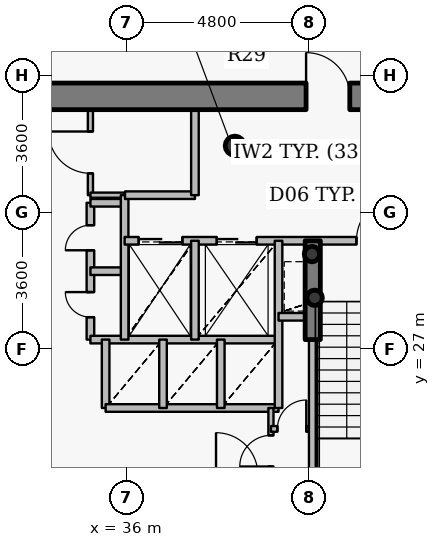
"""IFC4 building model, lengths in metres.
Left out: names, types, materials, properties, quantities, classifications, styles, units other than length and angle.
Written with IfcOpenShell. Run it as: python <this file> out.ifc"""

import sys

from ifc_helpers import new_model, si_unit, direction, frame, frame_2d, origin, origin_2d, place, context, subcontext, project, spatial, rectangle, hollow_circle, extrude, source, transform, mapped, element, fill, save


model = new_model("IFC4")
c1 = context("Model", 3, precision=1e-05, world=origin(), true_north=direction((0.0, 1.0)))
c2 = subcontext(c1, "Body", "Model", "MODEL_VIEW")
j1 = project(units=[si_unit("LENGTHUNIT", "METRE"), si_unit("PLANEANGLEUNIT", "RADIAN")], contexts=[c1])
p1 = place(None, origin())
s1 = spatial("IfcSite", under=j1, at=p1, CompositionType="ELEMENT")
p2 = place(p1, origin())
s2 = spatial("IfcBuilding", under=s1, at=p2, CompositionType="ELEMENT")
p3 = place(p2, frame((0.0, 0.0, 221.55)))
s3 = spatial("IfcBuildingStorey", under=s2, at=p3, CompositionType="ELEMENT", Elevation=221.55)
p4 = place(p3, frame((38.85, 32.35, 0.0), z_axis=(0.0, 0.0, 1.0), x_axis=(1.0, 0.0, 0.0)))
e1 = element("IfcColumn", 1, at=p4, inside=s3, PredefinedType="COLUMN", context=c2, shape_type="SweptSolid", body=[
    extrude(hollow_circle(Radius=0.254, WallThickness=0.02, at=origin_2d()), origin(), (0.0, 0.0, 1.0), 3.75),
])
for number, where, z_axis, x_axis in (
    (2, (40.95, 28.35, 0.0), (0.0, 0.0, 1.0), (1.0, 0.0, 0.0)),
    (3, (40.88, 29.5, 0.0), (0.0, 0.0, 1.0), (1.0, 0.0, 0.0)),
):
    element("IfcColumn", number, at=place(p3, frame(where, z_axis=z_axis, x_axis=x_axis)), inside=s3, PredefinedType="COLUMN", context=c2, shape_type="SweptSolid", body=[
        extrude(hollow_circle(Radius=0.203, WallThickness=0.016, at=origin_2d()), origin(), (0.0, 0.0, 1.0), 3.75),
    ])
p5 = place(p3, frame((27.05, 33.65, 0.0), z_axis=(0.0, 0.0, 1.0), x_axis=(1.0, 0.0, 0.0)))
e4 = element("IfcWall", 4, at=p5, inside=s3, PredefinedType="SHEAR", context=c2, shape_type="SweptSolid", body=[
    extrude(rectangle(XDim=17.9, YDim=0.7, at=frame_2d((8.95, 0.0))), origin(), (0.0, 0.0, 1.0), 3.05),
])
p6 = place(p5, frame((13.675, 0.0, 0.0)))
e5 = element("IfcOpeningElement", 5, at=p6, cuts=e4, PredefinedType="OPENING", context=c2, shape_type="SweptSolid", body=[
    extrude(rectangle(XDim=1.15, YDim=2.15, at=origin_2d()), frame((0.575, 0.36, 1.075), z_axis=(0.0, -1.0, 0.0), x_axis=(1.0, 0.0, 0.0)), (0.0, 0.0, 1.0), 0.72),
])
p7 = place(p3, frame((40.9, 27.25, 0.0), z_axis=(0.0, 0.0, 1.0), x_axis=(0.0, 1.0, 0.0)))
e6 = element("IfcWall", 6, at=p7, inside=s3, PredefinedType="SHEAR", context=c2, shape_type="SweptSolid", body=[
    extrude(rectangle(XDim=2.6, YDim=0.4, at=frame_2d((1.3, 0.0))), origin(), (0.0, 0.0, 1.0), 3.1),
])
p8 = place(p3, frame((35.05, 27.25, 0.0), z_axis=(0.0, 0.0, 1.0), x_axis=(0.0, 1.0, 0.0)))
e7 = element("IfcWall", 7, at=p8, inside=s3, PredefinedType="PARTITIONING", context=c2, shape_type="SweptSolid", body=[
    extrude(rectangle(XDim=3.6, YDim=0.2, at=frame_2d((1.8, 0.0))), origin(), (0.0, 0.0, 1.0), 3.5),
])
p9 = place(p8, frame((0.59, 0.0, 0.0)))
e8 = element("IfcOpeningElement", 8, at=p9, cuts=e7, PredefinedType="OPENING", context=c2, shape_type="SweptSolid", body=[
    extrude(rectangle(XDim=0.66, YDim=2.05, at=origin_2d()), frame((0.33, 0.11, 1.025), z_axis=(0.0, -1.0, 0.0), x_axis=(1.0, 0.0, 0.0)), (0.0, 0.0, 1.0), 0.22),
])
p10 = place(p8, frame((2.35, 0.0, 0.0)))
e9 = element("IfcOpeningElement", 9, at=p10, cuts=e7, PredefinedType="OPENING", context=c2, shape_type="SweptSolid", body=[
    extrude(rectangle(XDim=0.66, YDim=2.05, at=origin_2d()), frame((0.33, 0.11, 1.025), z_axis=(0.0, -1.0, 0.0), x_axis=(1.0, 0.0, 0.0)), (0.0, 0.0, 1.0), 0.22),
])
p11 = place(p3, frame((35.05, 27.25, 0.0), z_axis=(0.0, 0.0, 1.0), x_axis=(1.0, 0.0, 0.0)))
e10 = element("IfcWall", 10, at=p11, inside=s3, PredefinedType="PARTITIONING", context=c2, shape_type="SweptSolid", body=[
    extrude(rectangle(XDim=4.95, YDim=0.2, at=frame_2d((2.475, 0.0))), origin(), (0.0, 0.0, 1.0), 3.085),
])
for number, where, z_axis, x_axis in (
    (11, (35.05, 29.05, 0.0), (0.0, 0.0, 1.0), (1.0, 0.0, 0.0)),
    (12, (35.05, 30.85, 0.0), (0.0, 0.0, 1.0), (1.0, 0.0, 0.0)),
):
    element("IfcWall", number, at=place(p3, frame(where, z_axis=z_axis, x_axis=x_axis)), inside=s3, PredefinedType="PARTITIONING", context=c2, shape_type="SweptSolid", body=[
        extrude(rectangle(XDim=0.9, YDim=0.2, at=frame_2d((0.45, 0.0))), origin(), (0.0, 0.0, 1.0), 3.5),
    ])
p12 = place(p3, frame((35.05, 31.05, 0.0), z_axis=(0.0, 0.0, 1.0), x_axis=(0.0, 1.0, 0.0)))
e13 = element("IfcWall", 13, at=p12, inside=s3, PredefinedType="PARTITIONING", context=c2, shape_type="SweptSolid", body=[
    extrude(rectangle(XDim=2.25, YDim=0.135, at=frame_2d((1.125, 0.0))), origin(), (0.0, 0.0, 1.0), 3.085),
])
p13 = place(p12, frame((0.575, 0.0, 0.0)))
e14 = element("IfcOpeningElement", 14, at=p13, cuts=e13, PredefinedType="OPENING", context=c2, shape_type="SweptSolid", body=[
    extrude(rectangle(XDim=1.1, YDim=2.15, at=origin_2d()), frame((0.55, 0.078, 1.075), z_axis=(0.0, -1.0, 0.0), x_axis=(1.0, 0.0, 0.0)), (0.0, 0.0, 1.0), 0.155),
])
p14 = place(p3, frame((35.05, 31.05, 0.0), z_axis=(0.0, 0.0, 1.0), x_axis=(1.0, 0.0, 0.0)))
e15 = element("IfcWall", 15, at=p14, inside=s3, PredefinedType="PARTITIONING", context=c2, shape_type="SweptSolid", body=[
    extrude(rectangle(XDim=0.9, YDim=0.135, at=frame_2d((0.45, 0.0))), origin(), (0.0, 0.0, 1.0), 3.5),
])
p15 = place(p3, frame((35.45, 25.45, 0.0), z_axis=(0.0, 0.0, 1.0), x_axis=(0.0, 1.0, 0.0)))
e16 = element("IfcWall", 16, at=p15, inside=s3, PredefinedType="PARTITIONING", context=c2, shape_type="SweptSolid", body=[
    extrude(rectangle(XDim=1.8, YDim=0.2, at=frame_2d((0.9, 0.0))), origin(), (0.0, 0.0, 1.0), 3.5),
])
p16 = place(p3, frame((35.45, 25.45, 0.0), z_axis=(0.0, 0.0, 1.0), x_axis=(1.0, 0.0, 0.0)))
e17 = element("IfcWall", 17, at=p16, inside=s3, PredefinedType="PARTITIONING", context=c2, shape_type="SweptSolid", body=[
    extrude(rectangle(XDim=4.55, YDim=0.2, at=frame_2d((2.275, 0.0))), origin(), (0.0, 0.0, 1.0), 3.085),
])
p17 = place(p3, frame((35.95, 27.25, 0.0), z_axis=(0.0, 0.0, 1.0), x_axis=(0.0, 1.0, 0.0)))
e18 = element("IfcWall", 18, at=p17, inside=s3, PredefinedType="PARTITIONING", context=c2, shape_type="SweptSolid", body=[
    extrude(rectangle(XDim=3.8, YDim=0.2, at=frame_2d((1.9, 0.0))), origin(), (0.0, 0.0, 1.0), 3.5),
])
p18 = place(p3, frame((35.95, 29.85, 0.0), z_axis=(0.0, 0.0, 1.0), x_axis=(1.0, 0.0, 0.0)))
e19 = element("IfcWall", 19, at=p18, inside=s3, PredefinedType="PARTITIONING", context=c2, shape_type="SweptSolid", body=[
    extrude(rectangle(XDim=8.49, YDim=0.2, at=frame_2d((4.245, 0.0))), origin(), (0.0, 0.0, 1.0), 3.085),
])
p19 = place(p18, frame((6.1, 0.0, 0.0)))
e20 = element("IfcOpeningElement", 20, at=p19, cuts=e19, PredefinedType="OPENING", context=c2, shape_type="SweptSolid", body=[
    extrude(rectangle(XDim=1.2, YDim=2.15, at=origin_2d()), frame((0.6, 0.11, 1.075), z_axis=(0.0, -1.0, 0.0), x_axis=(1.0, 0.0, 0.0)), (0.0, 0.0, 1.0), 0.22),
])
p20 = place(p18, frame((0.37, 0.0, 0.0)))
e21 = element("IfcOpeningElement", 21, at=p20, cuts=e19, PredefinedType="OPENING", context=c2, shape_type="SweptSolid", body=[
    extrude(rectangle(XDim=1.15, YDim=2.15, at=origin_2d()), frame((0.575, 0.11, 1.075), z_axis=(0.0, -1.0, 0.0), x_axis=(1.0, 0.0, 0.0)), (0.0, 0.0, 1.0), 0.22),
])
p21 = place(p18, frame((2.425, 0.0, 0.0)))
e22 = element("IfcOpeningElement", 22, at=p21, cuts=e19, PredefinedType="OPENING", context=c2, shape_type="SweptSolid", body=[
    extrude(rectangle(XDim=1.05, YDim=2.15, at=origin_2d()), frame((0.525, 0.11, 1.075), z_axis=(0.0, -1.0, 0.0), x_axis=(1.0, 0.0, 0.0)), (0.0, 0.0, 1.0), 0.22),
])
p22 = place(p3, frame((35.96, 31.05, 0.0), z_axis=(0.0, 0.0, 1.0), x_axis=(1.0, 0.0, 0.0)))
e23 = element("IfcWall", 23, at=p22, inside=s3, PredefinedType="PARTITIONING", context=c2, shape_type="SweptSolid", body=[
    extrude(rectangle(XDim=1.84, YDim=0.2, at=frame_2d((0.92, 0.0))), origin(), (0.0, 0.0, 1.0), 3.5),
])
p23 = place(p3, frame((36.96, 25.45, 0.0), z_axis=(0.0, 0.0, 1.0), x_axis=(0.0, 1.0, 0.0)))
e24 = element("IfcWall", 24, at=p23, inside=s3, PredefinedType="PARTITIONING", context=c2, shape_type="SweptSolid", body=[
    extrude(rectangle(XDim=1.8, YDim=0.2, at=frame_2d((0.9, 0.0))), origin(), (0.0, 0.0, 1.0), 3.5),
])
p24 = place(p3, frame((37.8, 27.25, 0.0), z_axis=(0.0, 0.0, 1.0), x_axis=(0.0, 1.0, 0.0)))
e25 = element("IfcWall", 25, at=p24, inside=s3, PredefinedType="PARTITIONING", context=c2, shape_type="SweptSolid", body=[
    extrude(rectangle(XDim=2.6, YDim=0.2, at=frame_2d((1.3, 0.0))), origin(), (0.0, 0.0, 1.0), 3.5),
])
p25 = place(p3, frame((37.8, 31.05, 0.0), z_axis=(0.0, 0.0, 1.0), x_axis=(0.0, 1.0, 0.0)))
e26 = element("IfcWall", 26, at=p25, inside=s3, PredefinedType="PARTITIONING", context=c2, shape_type="SweptSolid", body=[
    extrude(rectangle(XDim=2.25, YDim=0.2, at=frame_2d((1.125, 0.0))), origin(), (0.0, 0.0, 1.0), 3.085),
])
p26 = place(p3, frame((38.48, 25.45, 0.0), z_axis=(0.0, 0.0, 1.0), x_axis=(0.0, 1.0, 0.0)))
e27 = element("IfcWall", 27, at=p26, inside=s3, PredefinedType="PARTITIONING", context=c2, shape_type="SweptSolid", body=[
    extrude(rectangle(XDim=1.8, YDim=0.2, at=frame_2d((0.9, 0.0))), origin(), (0.0, 0.0, 1.0), 3.5),
])
p27 = place(p3, frame((39.8, 23.7, 0.0), z_axis=(0.0, 0.0, 1.0), x_axis=(0.0, 1.0, 0.0)))
e28 = element("IfcWall", 28, at=p27, inside=s3, PredefinedType="PARTITIONING", context=c2, shape_type="SweptSolid", body=[
    extrude(rectangle(XDim=1.75, YDim=0.135, at=frame_2d((0.875, 0.0))), origin(), (0.0, 0.0, 1.0), 3.5),
])
p28 = place(p27, frame((0.21, 0.0, 0.0)))
e29 = element("IfcOpeningElement", 29, at=p28, cuts=e28, PredefinedType="OPENING", context=c2, shape_type="SweptSolid", body=[
    extrude(rectangle(XDim=0.82, YDim=2.1, at=origin_2d()), frame((0.41, 0.078, 1.05), z_axis=(0.0, -1.0, 0.0), x_axis=(1.0, 0.0, 0.0)), (0.0, 0.0, 1.0), 0.155),
])
p29 = place(p3, frame((39.8, 24.9, 0.0), z_axis=(0.0, 0.0, 1.0), x_axis=(1.0, 0.0, 0.0)))
e30 = element("IfcWall", 30, at=p29, inside=s3, PredefinedType="PARTITIONING", context=c2, shape_type="SweptSolid", body=[
    extrude(rectangle(XDim=1.1, YDim=0.15, at=frame_2d((0.55, 0.0))), origin(), (0.0, 0.0, 1.0), 3.5),
])
p30 = place(p29, frame((0.17, 0.0, 0.0)))
e31 = element("IfcOpeningElement", 31, at=p30, cuts=e30, PredefinedType="OPENING", context=c2, shape_type="SweptSolid", body=[
    extrude(rectangle(XDim=0.76, YDim=2.1, at=origin_2d()), frame((0.38, 0.085, 1.05), z_axis=(0.0, -1.0, 0.0), x_axis=(1.0, 0.0, 0.0)), (0.0, 0.0, 1.0), 0.17),
])
p31 = place(p3, frame((40.0, 25.45, 0.0), z_axis=(0.0, 0.0, 1.0), x_axis=(0.0, 1.0, 0.0)))
e32 = element("IfcWall", 32, at=p31, inside=s3, PredefinedType="PARTITIONING", context=c2, shape_type="SweptSolid", body=[
    extrude(rectangle(XDim=4.4, YDim=0.2, at=frame_2d((2.2, 0.0))), origin(), (0.0, 0.0, 1.0), 3.5),
])
p32 = place(p3, frame((40.0, 27.85, 0.0), z_axis=(0.0, 0.0, 1.0), x_axis=(1.0, 0.0, 0.0)))
e33 = element("IfcWall", 33, at=p32, inside=s3, PredefinedType="PARTITIONING", context=c2, shape_type="SweptSolid", body=[
    extrude(rectangle(XDim=0.9, YDim=0.2, at=frame_2d((0.45, 0.0))), origin(), (0.0, 0.0, 1.0), 3.5),
])
p33 = place(p3, frame((40.9, 21.33, 0.0), z_axis=(0.0, 0.0, 1.0), x_axis=(0.0, 1.0, 0.0)))
e34 = element("IfcWall", 34, at=p33, inside=s3, PredefinedType="PARTITIONING", context=c2, shape_type="SweptSolid", body=[
    extrude(rectangle(XDim=5.91, YDim=0.2, at=frame_2d((2.955, 0.0))), origin(), (0.0, 0.0, 1.0), 3.035),
])
m1 = source(origin(), c2, "Body", "SweptSolid", [
    extrude(rectangle(XDim=1.15, YDim=2.15, at=origin_2d()), frame((0.575, 0.025, 1.075), z_axis=(0.0, -1.0, 0.0), x_axis=(1.0, 0.0, 0.0)), (0.0, 0.0, 1.0), 0.05),
])
p34 = place(p6, origin())
e35 = element("IfcDoor", 35, at=p34, inside=s3, OperationType="SINGLE_SWING_LEFT", PredefinedType="DOOR", context=c2, shape_type="MappedRepresentation", body=[
    mapped(m1, transform((0.0, 0.0, 0.0), x_axis=(1.0, 0.0, 0.0), y_axis=(0.0, 1.0, 0.0), z_axis=(0.0, 0.0, 1.0), scale=1.0)),
])
fill(e5, e35)
m2 = source(origin(), c2, "Body", "SweptSolid", [
    extrude(rectangle(XDim=1.2, YDim=2.15, at=origin_2d()), frame((0.6, 0.025, 1.075), z_axis=(0.0, -1.0, 0.0), x_axis=(1.0, 0.0, 0.0)), (0.0, 0.0, 1.0), 0.05),
])
p35 = place(p19, origin())
e36 = element("IfcDoor", 36, at=p35, inside=s3, OperationType="SINGLE_SWING_RIGHT", PredefinedType="DOOR", context=c2, shape_type="MappedRepresentation", body=[
    mapped(m2, transform((0.0, 0.0, 0.0), x_axis=(1.0, 0.0, 0.0), y_axis=(0.0, 1.0, 0.0), z_axis=(0.0, 0.0, 1.0), scale=1.0)),
])
fill(e20, e36)
m3 = source(origin(), c2, "Body", "SweptSolid", [
    extrude(rectangle(XDim=1.15, YDim=2.15, at=origin_2d()), frame((0.575, 0.025, 1.075), z_axis=(0.0, -1.0, 0.0), x_axis=(1.0, 0.0, 0.0)), (0.0, 0.0, 1.0), 0.05),
])
p36 = place(p20, origin())
e37 = element("IfcDoor", 37, at=p36, inside=s3, OperationType="DOUBLE_DOOR_SLIDING", PredefinedType="USERDEFINED", context=c2, shape_type="MappedRepresentation", body=[
    mapped(m3, transform((0.0, 0.0, 0.0), x_axis=(1.0, 0.0, 0.0), y_axis=(0.0, 1.0, 0.0), z_axis=(0.0, 0.0, 1.0), scale=1.0)),
])
fill(e21, e37)
m4 = source(origin(), c2, "Body", "SweptSolid", [
    extrude(rectangle(XDim=1.05, YDim=2.15, at=origin_2d()), frame((0.525, 0.025, 1.075), z_axis=(0.0, -1.0, 0.0), x_axis=(1.0, 0.0, 0.0)), (0.0, 0.0, 1.0), 0.05),
])
p37 = place(p21, origin())
e38 = element("IfcDoor", 38, at=p37, inside=s3, OperationType="DOUBLE_DOOR_SLIDING", PredefinedType="USERDEFINED", context=c2, shape_type="MappedRepresentation", body=[
    mapped(m4, transform((0.0, 0.0, 0.0), x_axis=(1.0, 0.0, 0.0), y_axis=(0.0, 1.0, 0.0), z_axis=(0.0, 0.0, 1.0), scale=1.0)),
])
fill(e22, e38)
m5 = source(origin(), c2, "Body", "SweptSolid", [
    extrude(rectangle(XDim=0.66, YDim=2.05, at=origin_2d()), frame((0.33, 0.025, 1.025), z_axis=(0.0, -1.0, 0.0), x_axis=(1.0, 0.0, 0.0)), (0.0, 0.0, 1.0), 0.05),
])
p38 = place(p9, origin())
e39 = element("IfcDoor", 39, at=p38, inside=s3, OperationType="SINGLE_SWING_RIGHT", PredefinedType="USERDEFINED", context=c2, shape_type="MappedRepresentation", body=[
    mapped(m5, transform((0.0, 0.0, 0.0), x_axis=(1.0, 0.0, 0.0), y_axis=(0.0, 1.0, 0.0), z_axis=(0.0, 0.0, 1.0), scale=1.0)),
])
fill(e8, e39)
p39 = place(p10, origin())
e40 = element("IfcDoor", 40, at=p39, inside=s3, OperationType="SINGLE_SWING_LEFT", PredefinedType="USERDEFINED", context=c2, shape_type="MappedRepresentation", body=[
    mapped(m5, transform((0.0, 0.0, 0.0), x_axis=(1.0, 0.0, 0.0), y_axis=(0.0, 1.0, 0.0), z_axis=(0.0, 0.0, 1.0), scale=1.0)),
])
fill(e9, e40)
m6 = source(origin(), c2, "Body", "SweptSolid", [
    extrude(rectangle(XDim=1.1, YDim=2.15, at=origin_2d()), frame((0.55, 0.025, 1.075), z_axis=(0.0, -1.0, 0.0), x_axis=(1.0, 0.0, 0.0)), (0.0, 0.0, 1.0), 0.05),
])
p40 = place(p13, origin())
e41 = element("IfcDoor", 41, at=p40, inside=s3, OperationType="SINGLE_SWING_RIGHT", PredefinedType="DOOR", context=c2, shape_type="MappedRepresentation", body=[
    mapped(m6, transform((0.0, 0.0, 0.0), x_axis=(1.0, 0.0, 0.0), y_axis=(0.0, 1.0, 0.0), z_axis=(0.0, 0.0, 1.0), scale=1.0)),
])
fill(e14, e41)
m7 = source(origin(), c2, "Body", "SweptSolid", [
    extrude(rectangle(XDim=0.82, YDim=2.1, at=origin_2d()), frame((0.41, 0.025, 1.05), z_axis=(0.0, -1.0, 0.0), x_axis=(1.0, 0.0, 0.0)), (0.0, 0.0, 1.0), 0.05),
])
p41 = place(p28, origin())
e42 = element("IfcDoor", 42, at=p41, inside=s3, OperationType="SINGLE_SWING_LEFT", PredefinedType="DOOR", context=c2, shape_type="MappedRepresentation", body=[
    mapped(m7, transform((0.0, 0.0, 0.0), x_axis=(1.0, 0.0, 0.0), y_axis=(0.0, 1.0, 0.0), z_axis=(0.0, 0.0, 1.0), scale=1.0)),
])
fill(e29, e42)
m8 = source(origin(), c2, "Body", "SweptSolid", [
    extrude(rectangle(XDim=0.76, YDim=2.1, at=origin_2d()), frame((0.38, 0.025, 1.05), z_axis=(0.0, -1.0, 0.0), x_axis=(1.0, 0.0, 0.0)), (0.0, 0.0, 1.0), 0.05),
])
p42 = place(p30, origin())
e43 = element("IfcDoor", 43, at=p42, inside=s3, OperationType="SINGLE_SWING_RIGHT", PredefinedType="DOOR", context=c2, shape_type="MappedRepresentation", body=[
    mapped(m8, transform((0.0, 0.0, 0.0), x_axis=(1.0, 0.0, 0.0), y_axis=(0.0, 1.0, 0.0), z_axis=(0.0, 0.0, 1.0), scale=1.0)),
])
fill(e31, e43)
save(model, sys.argv[1])
